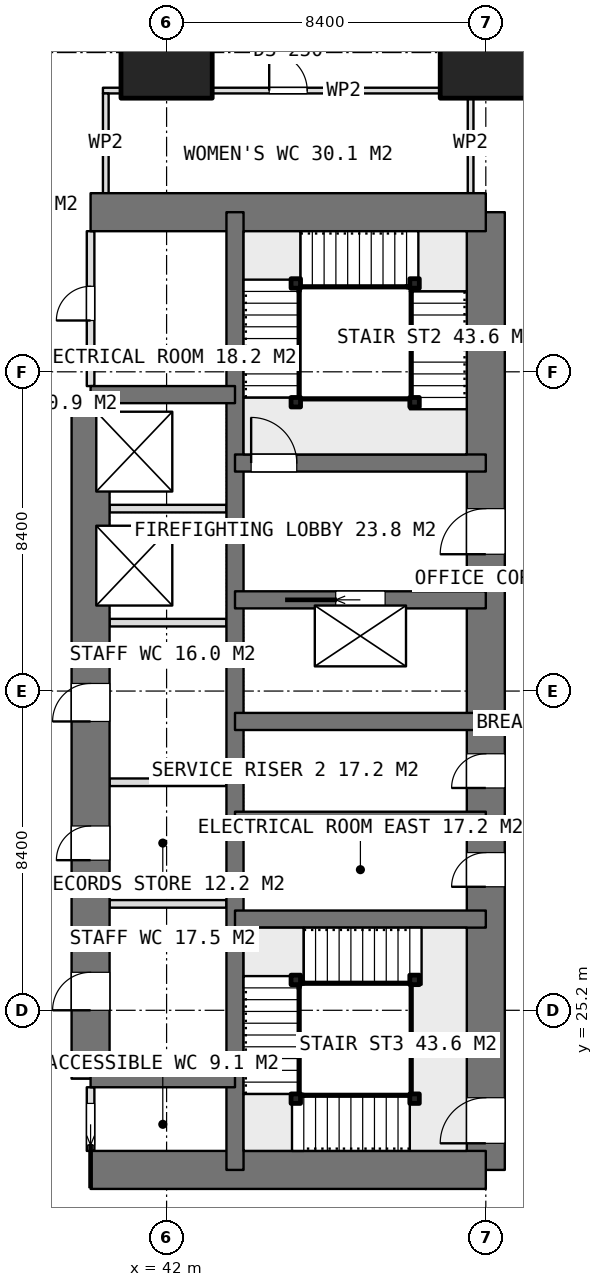
"""IFC4 building model, lengths in metres.
Left out: names, types, materials, properties, quantities, classifications, styles, units other than length and angle.
Written with IfcOpenShell. Run it as: python <this file> out.ifc"""

import sys

from ifc_helpers import new_model, si_unit, direction, frame, frame_2d, origin, origin_2d, place, context, subcontext, project, spatial, rectangle, extrude, element, fill, save


model = new_model("IFC4")
c1 = context("Model", 3, precision=1e-05, world=origin(), true_north=direction((0.0, 1.0)))
c2 = subcontext(c1, "Body", "Model", "MODEL_VIEW")
j1 = project(units=[si_unit("LENGTHUNIT", "METRE"), si_unit("PLANEANGLEUNIT", "RADIAN")], contexts=[c1])
p1 = place(None, origin())
s1 = spatial("IfcSite", under=j1, at=p1, CompositionType="ELEMENT")
p2 = place(p1, origin())
s2 = spatial("IfcBuilding", under=s1, at=p2, CompositionType="ELEMENT")
p3 = place(p2, frame((0.0, 0.0, 228.95)))
s3 = spatial("IfcBuildingStorey", under=s2, at=p3, CompositionType="ELEMENT", Elevation=228.95)
for number, where, z_axis, x_axis in (
    (1, (40.0, 21.0, 0.0), (0.0, 0.0, 1.0), (1.0, 0.0, 0.0)),
    (2, (40.0, 46.2, 0.0), (0.0, 0.0, 1.0), (1.0, 0.0, 0.0)),
):
    element("IfcWall", number, at=place(p3, frame(where, z_axis=z_axis, x_axis=x_axis)), inside=s3, PredefinedType="SHEAR", context=c2, shape_type="SweptSolid", body=[
        extrude(rectangle(XDim=10.4, YDim=1.0, at=frame_2d((5.2, 0.0))), origin(), (0.0, 0.0, 1.0), 3.75),
    ])
p4 = place(p3, frame((50.4, 21.0, 0.0), z_axis=(0.0, 0.0, 1.0), x_axis=(0.0, 1.0, 0.0)))
e3 = element("IfcWall", 3, at=p4, inside=s3, PredefinedType="SHEAR", context=c2, shape_type="SweptSolid", body=[
    extrude(rectangle(XDim=25.2, YDim=1.0, at=frame_2d((12.6, 0.0))), origin(), (0.0, 0.0, 1.0), 3.75),
])
p5 = place(p4, frame((16.2, 0.0, 0.0)))
e4 = element("IfcOpeningElement", 4, at=p5, cuts=e3, PredefinedType="OPENING", context=c2, shape_type="SweptSolid", body=[
    extrude(rectangle(XDim=1.2, YDim=2.1, at=frame_2d((0.6, 1.05))), frame((0.0, 0.51, 0.0), z_axis=(0.0, -1.0, 0.0), x_axis=(1.0, 0.0, 0.0)), (0.0, 0.0, 1.0), 1.02),
])
p6 = place(p4, frame((10.05, 0.0, 0.0)))
e5 = element("IfcOpeningElement", 5, at=p6, cuts=e3, PredefinedType="OPENING", context=c2, shape_type="SweptSolid", body=[
    extrude(rectangle(XDim=0.9, YDim=2.1, at=frame_2d((0.45, 1.05))), frame((0.0, 0.51, 0.0), z_axis=(0.0, -1.0, 0.0), x_axis=(1.0, 0.0, 0.0)), (0.0, 0.0, 1.0), 1.02),
])
p7 = place(p4, frame((7.45, 0.0, 0.0)))
e6 = element("IfcOpeningElement", 6, at=p7, cuts=e3, PredefinedType="OPENING", context=c2, shape_type="SweptSolid", body=[
    extrude(rectangle(XDim=0.9, YDim=2.1, at=frame_2d((0.45, 1.05))), frame((0.0, 0.51, 0.0), z_axis=(0.0, -1.0, 0.0), x_axis=(1.0, 0.0, 0.0)), (0.0, 0.0, 1.0), 1.02),
])
p8 = place(p4, frame((0.7, 0.0, 0.0)))
e7 = element("IfcOpeningElement", 7, at=p8, cuts=e3, PredefinedType="OPENING", context=c2, shape_type="SweptSolid", body=[
    extrude(rectangle(XDim=1.2, YDim=2.1, at=frame_2d((0.6, 1.05))), frame((0.0, 0.51, 0.0), z_axis=(0.0, -1.0, 0.0), x_axis=(1.0, 0.0, 0.0)), (0.0, 0.0, 1.0), 1.02),
])
p9 = place(p3, frame((43.8, 21.0, 0.0), z_axis=(0.0, 0.0, 1.0), x_axis=(0.0, 1.0, 0.0)))
e8 = element("IfcWall", 8, at=p9, inside=s3, PredefinedType="SHEAR", context=c2, shape_type="SweptSolid", body=[
    extrude(rectangle(XDim=25.2, YDim=0.45, at=frame_2d((12.6, 0.0))), origin(), (0.0, 0.0, 1.0), 3.75),
])
p10 = place(p3, frame((40.0, 23.4, 0.0), z_axis=(0.0, 0.0, 1.0), x_axis=(0.0, 1.0, 0.0)))
e9 = element("IfcWall", 9, at=p10, inside=s3, PredefinedType="SHEAR", context=c2, shape_type="SweptSolid", body=[
    extrude(rectangle(XDim=18.0, YDim=1.0, at=frame_2d((9.0, 0.0))), origin(), (0.0, 0.0, 1.0), 3.75),
])
p11 = place(p10, frame((1.8, 0.0, 0.0)))
e10 = element("IfcOpeningElement", 10, at=p11, cuts=e9, PredefinedType="OPENING", context=c2, shape_type="SweptSolid", body=[
    extrude(rectangle(XDim=1.0, YDim=2.1, at=frame_2d((0.5, 1.05))), frame((0.0, 0.51, 0.0), z_axis=(0.0, -1.0, 0.0), x_axis=(1.0, 0.0, 0.0)), (0.0, 0.0, 1.0), 1.02),
])
p12 = place(p10, frame((5.75, 0.0, 0.0)))
e11 = element("IfcOpeningElement", 11, at=p12, cuts=e9, PredefinedType="OPENING", context=c2, shape_type="SweptSolid", body=[
    extrude(rectangle(XDim=0.9, YDim=2.1, at=frame_2d((0.45, 1.05))), frame((0.0, 0.51, 0.0), z_axis=(0.0, -1.0, 0.0), x_axis=(1.0, 0.0, 0.0)), (0.0, 0.0, 1.0), 1.02),
])
p13 = place(p10, frame((9.4, 0.0, 0.0)))
e12 = element("IfcOpeningElement", 12, at=p13, cuts=e9, PredefinedType="OPENING", context=c2, shape_type="SweptSolid", body=[
    extrude(rectangle(XDim=1.0, YDim=2.1, at=frame_2d((0.5, 1.05))), frame((0.0, 0.51, 0.0), z_axis=(0.0, -1.0, 0.0), x_axis=(1.0, 0.0, 0.0)), (0.0, 0.0, 1.0), 1.02),
])
for number, where, z_axis, x_axis in (
    (13, (40.0, 23.4, 0.0), (0.0, 0.0, 1.0), (1.0, 0.0, 0.0)),
    (14, (40.0, 41.4, 0.0), (0.0, 0.0, 1.0), (1.0, 0.0, 0.0)),
):
    element("IfcWall", number, at=place(p3, frame(where, z_axis=z_axis, x_axis=x_axis)), inside=s3, PredefinedType="SHEAR", context=c2, shape_type="SweptSolid", body=[
        extrude(rectangle(XDim=3.8, YDim=0.45, at=frame_2d((1.9, 0.0))), origin(), (0.0, 0.0, 1.0), 3.75),
    ])
for number, where, z_axis, x_axis in (
    (15, (43.8, 27.6, 0.0), (0.0, 0.0, 1.0), (1.0, 0.0, 0.0)),
    (16, (43.8, 30.2, 0.0), (0.0, 0.0, 1.0), (1.0, 0.0, 0.0)),
    (17, (43.8, 32.8, 0.0), (0.0, 0.0, 1.0), (1.0, 0.0, 0.0)),
):
    element("IfcWall", number, at=place(p3, frame(where, z_axis=z_axis, x_axis=x_axis)), inside=s3, PredefinedType="SHEAR", context=c2, shape_type="SweptSolid", body=[
        extrude(rectangle(XDim=6.6, YDim=0.45, at=frame_2d((3.3, 0.0))), origin(), (0.0, 0.0, 1.0), 3.75),
    ])
p14 = place(p3, frame((43.8, 36.0, 0.0), z_axis=(0.0, 0.0, 1.0), x_axis=(1.0, 0.0, 0.0)))
e18 = element("IfcWall", 18, at=p14, inside=s3, PredefinedType="SHEAR", context=c2, shape_type="SweptSolid", body=[
    extrude(rectangle(XDim=6.6, YDim=0.45, at=frame_2d((3.3, 0.0))), origin(), (0.0, 0.0, 1.0), 3.75),
])
p15 = place(p14, frame((2.65, 0.0, 0.0)))
e19 = element("IfcOpeningElement", 19, at=p15, cuts=e18, PredefinedType="OPENING", context=c2, shape_type="SweptSolid", body=[
    extrude(rectangle(XDim=1.3, YDim=2.1, at=frame_2d((0.65, 1.05))), frame((0.0, 0.235, 0.0), z_axis=(0.0, -1.0, 0.0), x_axis=(1.0, 0.0, 0.0)), (0.0, 0.0, 1.0), 0.47),
])
p16 = place(p3, frame((43.8, 39.6, 0.0), z_axis=(0.0, 0.0, 1.0), x_axis=(1.0, 0.0, 0.0)))
e20 = element("IfcWall", 20, at=p16, inside=s3, PredefinedType="SHEAR", context=c2, shape_type="SweptSolid", body=[
    extrude(rectangle(XDim=6.6, YDim=0.45, at=frame_2d((3.3, 0.0))), origin(), (0.0, 0.0, 1.0), 3.75),
])
p17 = place(p16, frame((0.425, 0.0, 0.0)))
e21 = element("IfcOpeningElement", 21, at=p17, cuts=e20, PredefinedType="OPENING", context=c2, shape_type="SweptSolid", body=[
    extrude(rectangle(XDim=1.2, YDim=2.1, at=frame_2d((0.6, 1.05))), frame((0.0, 0.235, 0.0), z_axis=(0.0, -1.0, 0.0), x_axis=(1.0, 0.0, 0.0)), (0.0, 0.0, 1.0), 0.47),
])
for number, where, z_axis, x_axis in (
    (22, (42.0, 50.4, 0.0), (0.0, 0.0, 1.0), (1.0, 0.0, 0.0)),
    (23, (50.4, 50.4, 0.0), (0.0, 0.0, 1.0), (1.0, 0.0, 0.0)),
):
    element("IfcColumn", number, at=place(p3, frame(where, z_axis=z_axis, x_axis=x_axis)), inside=s3, PredefinedType="COLUMN", context=c2, shape_type="SweptSolid", body=[
        extrude(rectangle(XDim=2.4, YDim=2.4, at=origin_2d()), origin(), (0.0, 0.0, 1.0), 3.75),
    ])
for number, where, z_axis, x_axis in (
    (24, (40.5, 35.4, 0.0), (0.0, 0.0, 1.0), (1.0, 0.0, 0.0)),
    (25, (40.5, 38.4, 0.0), (0.0, 0.0, 1.0), (1.0, 0.0, 0.0)),
):
    element("IfcWall", number, at=place(p3, frame(where, z_axis=z_axis, x_axis=x_axis)), inside=s3, PredefinedType="PARTITIONING", context=c2, shape_type="SweptSolid", body=[
        extrude(rectangle(XDim=3.075, YDim=0.2, at=frame_2d((1.538, 0.0))), origin(), (0.0, 0.0, 1.0), 3.5),
    ])
p18 = place(p3, frame((40.0, 21.5, 0.0), z_axis=(0.0, 0.0, 1.0), x_axis=(0.0, 1.0, 0.0)))
e26 = element("IfcWall", 26, at=p18, inside=s3, PredefinedType="PARTITIONING", context=c2, shape_type="SweptSolid", body=[
    extrude(rectangle(XDim=1.675, YDim=0.2, at=frame_2d((0.837, 0.0))), origin(), (0.0, 0.0, 1.0), 3.5),
])
p19 = place(p18, frame((0.15, 0.0, 0.0)))
e27 = element("IfcOpeningElement", 27, at=p19, cuts=e26, PredefinedType="OPENING", context=c2, shape_type="SweptSolid", body=[
    extrude(rectangle(XDim=1.1, YDim=2.1, at=frame_2d((0.55, 1.05))), frame((0.0, 0.11, 0.0), z_axis=(0.0, -1.0, 0.0), x_axis=(1.0, 0.0, 0.0)), (0.0, 0.0, 1.0), 0.22),
])
p20 = place(p3, frame((40.0, 41.625, 0.0), z_axis=(0.0, 0.0, 1.0), x_axis=(0.0, 1.0, 0.0)))
e28 = element("IfcWall", 28, at=p20, inside=s3, PredefinedType="PARTITIONING", context=c2, shape_type="SweptSolid", body=[
    extrude(rectangle(XDim=4.075, YDim=0.2, at=frame_2d((2.038, 0.0))), origin(), (0.0, 0.0, 1.0), 3.5),
])
p21 = place(p20, frame((1.725, 0.0, 0.0)))
e29 = element("IfcOpeningElement", 29, at=p21, cuts=e28, PredefinedType="OPENING", context=c2, shape_type="SweptSolid", body=[
    extrude(rectangle(XDim=0.9, YDim=2.1, at=frame_2d((0.45, 1.05))), frame((0.0, 0.11, 0.0), z_axis=(0.0, -1.0, 0.0), x_axis=(1.0, 0.0, 0.0)), (0.0, 0.0, 1.0), 0.22),
])
for number, where, z_axis, x_axis in (
    (30, (40.5, 28.0, 0.0), (0.0, 0.0, 1.0), (1.0, 0.0, 0.0)),
    (31, (40.5, 31.2, 0.0), (0.0, 0.0, 1.0), (1.0, 0.0, 0.0)),
):
    element("IfcWall", number, at=place(p3, frame(where, z_axis=z_axis, x_axis=x_axis)), inside=s3, PredefinedType="PARTITIONING", context=c2, shape_type="SweptSolid", body=[
        extrude(rectangle(XDim=3.075, YDim=0.2, at=frame_2d((1.538, 0.0))), origin(), (0.0, 0.0, 1.0), 3.5),
    ])
p22 = place(p3, frame((40.325, 49.4, 0.0), z_axis=(0.0, 0.0, 1.0), x_axis=(1.0, 0.0, 0.0)))
e32 = element("IfcWall", 32, at=p22, inside=s3, PredefinedType="PARTITIONING", context=c2, shape_type="SweptSolid", body=[
    extrude(rectangle(XDim=9.75, YDim=0.15, at=frame_2d((4.875, 0.0))), origin(), (0.0, 0.0, 1.0), 3.5),
])
p23 = place(p22, frame((4.375, 0.0, 0.0)))
e33 = element("IfcOpeningElement", 33, at=p23, cuts=e32, PredefinedType="OPENING", context=c2, shape_type="SweptSolid", body=[
    extrude(rectangle(XDim=1.0, YDim=2.1, at=frame_2d((0.5, 1.05))), frame((0.0, 0.085, 0.0), z_axis=(0.0, -1.0, 0.0), x_axis=(1.0, 0.0, 0.0)), (0.0, 0.0, 1.0), 0.17),
])
for number, where, z_axis, x_axis in (
    (34, (40.4, 46.7, 0.0), (0.0, 0.0, 1.0), (0.0, 1.0, 0.0)),
    (35, (50.0, 46.7, 0.0), (0.0, 0.0, 1.0), (0.0, 1.0, 0.0)),
):
    element("IfcWall", number, at=place(p3, frame(where, z_axis=z_axis, x_axis=x_axis)), inside=s3, PredefinedType="PARTITIONING", context=c2, shape_type="SweptSolid", body=[
        extrude(rectangle(XDim=2.625, YDim=0.15, at=frame_2d((1.312, 0.0))), origin(), (0.0, 0.0, 1.0), 3.5),
    ])
for number, where, z_axis, x_axis in (
    (36, (45.4, 41.2, 0.0), (0.0, 0.0, 1.0), (1.0, 0.0, 0.0)),
    (37, (45.4, 44.325, 0.0), (0.0, 0.0, 1.0), (1.0, 0.0, 0.0)),
    (38, (48.525, 44.325, 0.0), (0.0, 0.0, 1.0), (1.0, 0.0, 0.0)),
    (39, (48.525, 41.2, 0.0), (0.0, 0.0, 1.0), (1.0, 0.0, 0.0)),
    (40, (48.525, 22.875, 0.0), (0.0, 0.0, 1.0), (1.0, 0.0, 0.0)),
    (41, (45.4, 22.875, 0.0), (0.0, 0.0, 1.0), (1.0, 0.0, 0.0)),
    (42, (45.4, 26.0, 0.0), (0.0, 0.0, 1.0), (1.0, 0.0, 0.0)),
    (43, (48.525, 26.0, 0.0), (0.0, 0.0, 1.0), (1.0, 0.0, 0.0)),
):
    element("IfcColumn", number, at=place(p3, frame(where, z_axis=z_axis, x_axis=x_axis)), inside=s3, PredefinedType="COLUMN", context=c2, shape_type="SweptSolid", body=[
        extrude(rectangle(XDim=0.25, YDim=0.25, at=origin_2d()), origin(), (0.0, 0.0, 1.0), 3.75),
    ])
p24 = place(p5, origin())
e44 = element("IfcDoor", 44, at=p24, inside=s3, OperationType="SINGLE_SWING_LEFT", PredefinedType="DOOR", context=c2, shape_type="SweptSolid", body=[
    extrude(rectangle(XDim=1.2, YDim=2.1, at=frame_2d((0.6, 1.05))), frame((0.0, 0.025, 0.0), z_axis=(0.0, -1.0, 0.0), x_axis=(1.0, 0.0, 0.0)), (0.0, 0.0, 1.0), 0.05),
])
fill(e4, e44)
p25 = place(p6, origin())
e45 = element("IfcDoor", 45, at=p25, inside=s3, OperationType="SINGLE_SWING_LEFT", PredefinedType="DOOR", context=c2, shape_type="SweptSolid", body=[
    extrude(rectangle(XDim=0.9, YDim=2.1, at=frame_2d((0.45, 1.05))), frame((0.0, 0.025, 0.0), z_axis=(0.0, -1.0, 0.0), x_axis=(1.0, 0.0, 0.0)), (0.0, 0.0, 1.0), 0.05),
])
fill(e5, e45)
p26 = place(p7, origin())
e46 = element("IfcDoor", 46, at=p26, inside=s3, OperationType="SINGLE_SWING_LEFT", PredefinedType="DOOR", context=c2, shape_type="SweptSolid", body=[
    extrude(rectangle(XDim=0.9, YDim=2.1, at=frame_2d((0.45, 1.05))), frame((0.0, 0.025, 0.0), z_axis=(0.0, -1.0, 0.0), x_axis=(1.0, 0.0, 0.0)), (0.0, 0.0, 1.0), 0.05),
])
fill(e6, e46)
p27 = place(p19, origin())
e47 = element("IfcDoor", 47, at=p27, inside=s3, OperationType="SLIDING_TO_LEFT", PredefinedType="DOOR", context=c2, shape_type="SweptSolid", body=[
    extrude(rectangle(XDim=1.1, YDim=2.1, at=frame_2d((0.55, 1.05))), frame((0.0, 0.025, 0.0), z_axis=(0.0, -1.0, 0.0), x_axis=(1.0, 0.0, 0.0)), (0.0, 0.0, 1.0), 0.05),
])
fill(e27, e47)
p28 = place(p21, origin())
e48 = element("IfcDoor", 48, at=p28, inside=s3, OperationType="SINGLE_SWING_LEFT", PredefinedType="DOOR", context=c2, shape_type="SweptSolid", body=[
    extrude(rectangle(XDim=0.9, YDim=2.1, at=frame_2d((0.45, 1.05))), frame((0.0, 0.025, 0.0), z_axis=(0.0, -1.0, 0.0), x_axis=(1.0, 0.0, 0.0)), (0.0, 0.0, 1.0), 0.05),
])
fill(e29, e48)
p29 = place(p11, origin())
e49 = element("IfcDoor", 49, at=p29, inside=s3, OperationType="SINGLE_SWING_LEFT", PredefinedType="DOOR", context=c2, shape_type="SweptSolid", body=[
    extrude(rectangle(XDim=1.0, YDim=2.1, at=frame_2d((0.5, 1.05))), frame((0.0, 0.025, 0.0), z_axis=(0.0, -1.0, 0.0), x_axis=(1.0, 0.0, 0.0)), (0.0, 0.0, 1.0), 0.05),
])
fill(e10, e49)
p30 = place(p12, origin())
e50 = element("IfcDoor", 50, at=p30, inside=s3, OperationType="SINGLE_SWING_LEFT", PredefinedType="DOOR", context=c2, shape_type="SweptSolid", body=[
    extrude(rectangle(XDim=0.9, YDim=2.1, at=frame_2d((0.45, 1.05))), frame((0.0, 0.025, 0.0), z_axis=(0.0, -1.0, 0.0), x_axis=(1.0, 0.0, 0.0)), (0.0, 0.0, 1.0), 0.05),
])
fill(e11, e50)
p31 = place(p13, origin())
e51 = element("IfcDoor", 51, at=p31, inside=s3, OperationType="SINGLE_SWING_LEFT", PredefinedType="DOOR", context=c2, shape_type="SweptSolid", body=[
    extrude(rectangle(XDim=1.0, YDim=2.1, at=frame_2d((0.5, 1.05))), frame((0.0, 0.025, 0.0), z_axis=(0.0, -1.0, 0.0), x_axis=(1.0, 0.0, 0.0)), (0.0, 0.0, 1.0), 0.05),
])
fill(e12, e51)
p32 = place(p15, origin())
e52 = element("IfcDoor", 52, at=p32, inside=s3, OperationType="SLIDING_TO_LEFT", PredefinedType="USERDEFINED", context=c2, shape_type="SweptSolid", body=[
    extrude(rectangle(XDim=1.3, YDim=2.1, at=frame_2d((0.65, 1.05))), frame((0.0, 0.025, 0.0), z_axis=(0.0, -1.0, 0.0), x_axis=(1.0, 0.0, 0.0)), (0.0, 0.0, 1.0), 0.05),
])
fill(e19, e52)
p33 = place(p23, origin())
e53 = element("IfcDoor", 53, at=p33, inside=s3, OperationType="SINGLE_SWING_LEFT", PredefinedType="DOOR", context=c2, shape_type="SweptSolid", body=[
    extrude(rectangle(XDim=1.0, YDim=2.1, at=frame_2d((0.5, 1.05))), frame((0.0, 0.025, 0.0), z_axis=(0.0, -1.0, 0.0), x_axis=(1.0, 0.0, 0.0)), (0.0, 0.0, 1.0), 0.05),
])
fill(e33, e53)
p34 = place(p17, origin())
e54 = element("IfcDoor", 54, at=p34, inside=s3, OperationType="SINGLE_SWING_RIGHT", PredefinedType="DOOR", context=c2, shape_type="SweptSolid", body=[
    extrude(rectangle(XDim=1.2, YDim=2.1, at=frame_2d((0.6, 1.05))), frame((0.0, 0.025, 0.0), z_axis=(0.0, -1.0, 0.0), x_axis=(1.0, 0.0, 0.0)), (0.0, 0.0, 1.0), 0.05),
])
fill(e21, e54)
p35 = place(p8, origin())
e55 = element("IfcDoor", 55, at=p35, inside=s3, OperationType="SINGLE_SWING_RIGHT", PredefinedType="DOOR", context=c2, shape_type="SweptSolid", body=[
    extrude(rectangle(XDim=1.2, YDim=2.1, at=frame_2d((0.6, 1.05))), frame((0.0, 0.025, 0.0), z_axis=(0.0, -1.0, 0.0), x_axis=(1.0, 0.0, 0.0)), (0.0, 0.0, 1.0), 0.05),
])
fill(e7, e55)
save(model, sys.argv[1])
